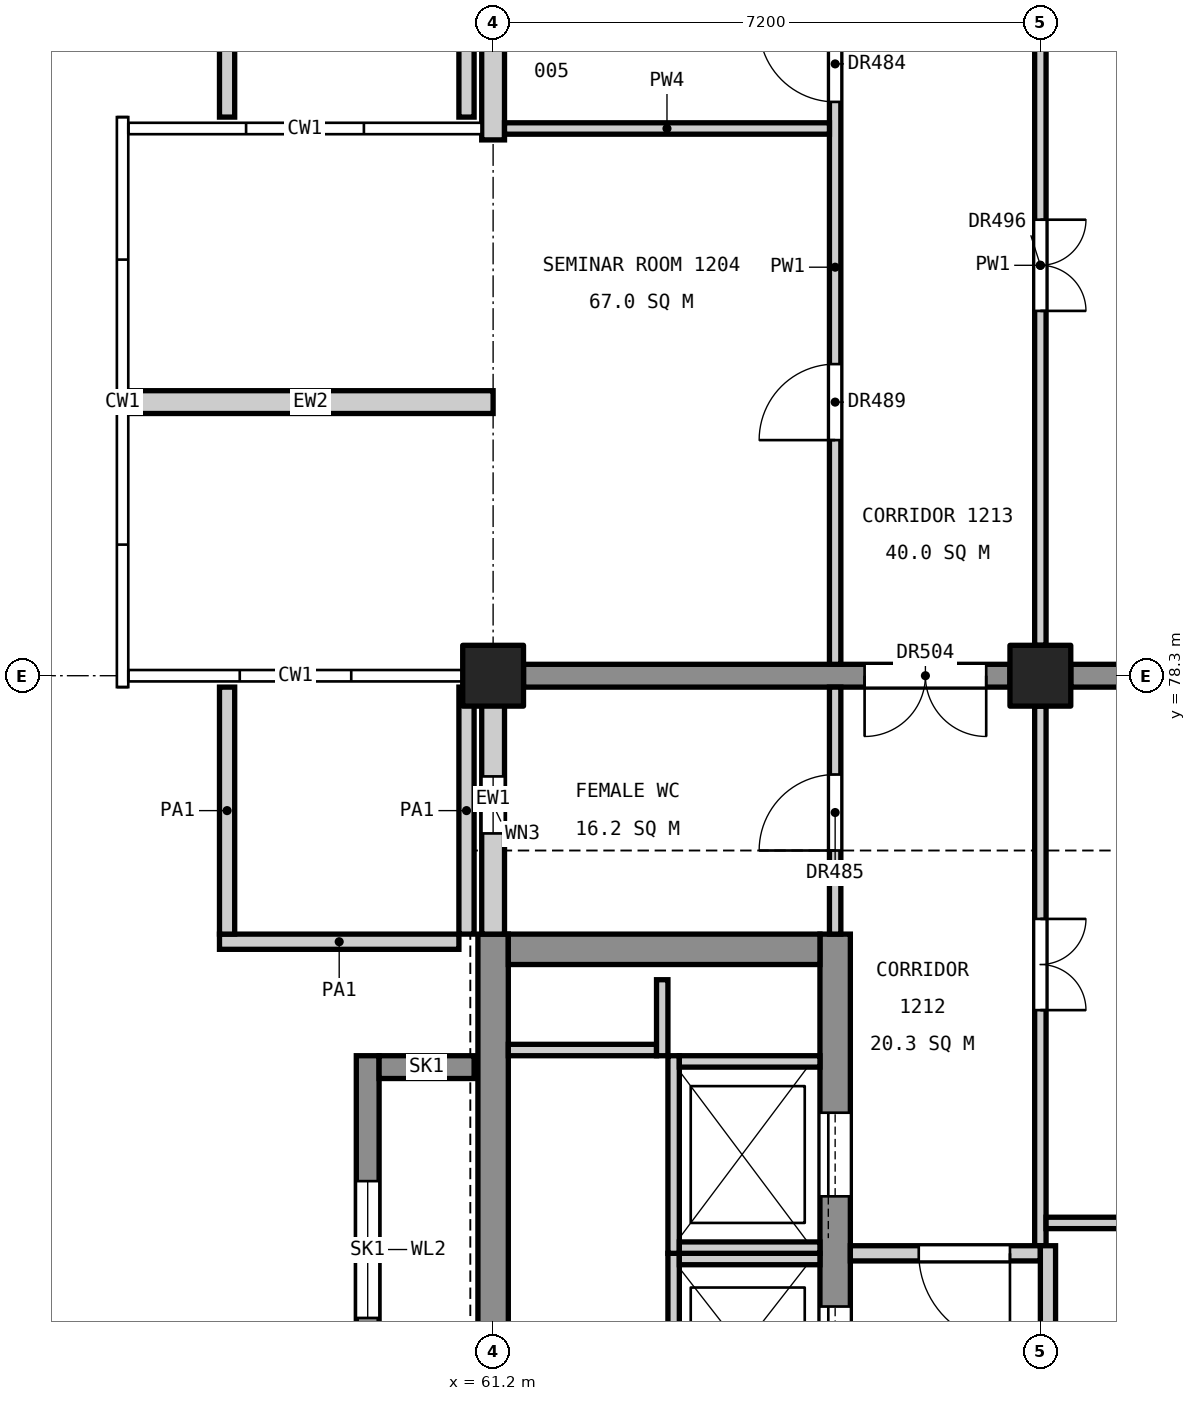
"""IFC4 building model, lengths in metres.
Left out: names, types, materials, properties, quantities, classifications, styles, units other than length and angle.
Written with IfcOpenShell. Run it as: python <this file> out.ifc"""

import sys

from ifc_helpers import new_model, si_unit, direction, frame, frame_2d, origin, origin_2d, place, context, subcontext, project, spatial, rectangle, extrude, element, fill, save


model = new_model("IFC4")
c1 = context("Model", 3, precision=1e-05, world=origin(), true_north=direction((0.0, 1.0)))
c2 = subcontext(c1, "Body", "Model", "MODEL_VIEW")
j1 = project(units=[si_unit("LENGTHUNIT", "METRE"), si_unit("PLANEANGLEUNIT", "RADIAN")], contexts=[c1])
p1 = place(None, origin())
s1 = spatial("IfcSite", under=j1, at=p1, CompositionType="ELEMENT")
p2 = place(p1, origin())
s2 = spatial("IfcBuilding", under=s1, at=p2, CompositionType="ELEMENT")
p3 = place(p2, frame((0.0, 0.0, 60.6)))
s3 = spatial("IfcBuildingStorey", under=s2, at=p3, CompositionType="ELEMENT", Elevation=60.6)
for number, where, z_axis, x_axis in (
    (1, (61.2, 78.3, 0.0), (0.0, 0.0, 1.0), (1.0, 0.0, 0.0)),
    (2, (68.4, 78.3, 0.0), (0.0, 0.0, 1.0), (1.0, 0.0, 0.0)),
):
    element("IfcColumn", number, at=place(p3, frame(where, z_axis=z_axis, x_axis=x_axis)), inside=s3, PredefinedType="COLUMN", context=c2, shape_type="SweptSolid", body=[
        extrude(rectangle(XDim=0.8, YDim=0.8, at=origin_2d()), origin(), (0.0, 0.0, 1.0), 4.8),
    ])
p4 = place(p3, frame((61.2, 60.1, 0.0), z_axis=(0.0, 0.0, 1.0), x_axis=(0.0, 1.0, 0.0)))
e3 = element("IfcWall", 3, at=p4, inside=s3, PredefinedType="SHEAR", context=c2, shape_type="SweptSolid", body=[
    extrude(rectangle(XDim=14.8, YDim=0.4, at=frame_2d((7.4, 0.0))), origin(), (0.0, 0.0, 1.0), 4.55),
])
p5 = place(p4, frame((6.11, 0.0, 3.4)))
e4 = element("IfcOpeningElement", 4, at=p5, cuts=e3, PredefinedType="OPENING", context=c2, shape_type="SweptSolid", body=[
    extrude(rectangle(XDim=1.2, YDim=0.9, at=frame_2d((0.6, 0.45))), frame((0.0, 0.21, 0.0), z_axis=(0.0, -1.0, 0.0), x_axis=(1.0, 0.0, 0.0)), (0.0, 0.0, 1.0), 0.42),
])
p6 = place(p3, frame((65.7, 60.1, 0.0), z_axis=(0.0, 0.0, 1.0), x_axis=(0.0, 1.0, 0.0)))
e5 = element("IfcWall", 5, at=p6, inside=s3, PredefinedType="SHEAR", context=c2, shape_type="SweptSolid", body=[
    extrude(rectangle(XDim=14.8, YDim=0.4, at=frame_2d((7.4, 0.0))), origin(), (0.0, 0.0, 1.0), 4.55),
])
p7 = place(p6, frame((0.5, 0.0, 0.0)))
e6 = element("IfcOpeningElement", 6, at=p7, cuts=e5, PredefinedType="OPENING", context=c2, shape_type="SweptSolid", body=[
    extrude(rectangle(XDim=1.4, YDim=2.1, at=frame_2d((0.7, 1.05))), frame((0.0, 0.21, 0.0), z_axis=(0.0, -1.0, 0.0), x_axis=(1.0, 0.0, 0.0)), (0.0, 0.0, 1.0), 0.42),
])
p8 = place(p6, frame((8.8, 0.0, 0.0)))
e7 = element("IfcOpeningElement", 7, at=p8, cuts=e5, PredefinedType="OPENING", context=c2, shape_type="SweptSolid", body=[
    extrude(rectangle(XDim=1.1, YDim=2.1, at=frame_2d((0.55, 1.05))), frame((0.0, 0.21, 0.0), z_axis=(0.0, -1.0, 0.0), x_axis=(1.0, 0.0, 0.0)), (0.0, 0.0, 1.0), 0.42),
])
p9 = place(p6, frame((11.35, 0.0, 0.0)))
e8 = element("IfcOpeningElement", 8, at=p9, cuts=e5, PredefinedType="OPENING", context=c2, shape_type="SweptSolid", body=[
    extrude(rectangle(XDim=1.1, YDim=2.1, at=frame_2d((0.55, 1.05))), frame((0.0, 0.21, 0.0), z_axis=(0.0, -1.0, 0.0), x_axis=(1.0, 0.0, 0.0)), (0.0, 0.0, 1.0), 0.42),
])
p10 = place(p3, frame((61.4, 74.7, 0.0), z_axis=(0.0, 0.0, 1.0), x_axis=(1.0, 0.0, 0.0)))
e9 = element("IfcWall", 9, at=p10, inside=s3, PredefinedType="SHEAR", context=c2, shape_type="SweptSolid", body=[
    extrude(rectangle(XDim=4.1, YDim=0.4, at=frame_2d((2.05, 0.0))), origin(), (0.0, 0.0, 1.0), 4.55),
])
p11 = place(p3, frame((59.55, 68.2, 0.0), z_axis=(0.0, 0.0, 1.0), x_axis=(0.0, 1.0, 0.0)))
e10 = element("IfcWall", 10, at=p11, inside=s3, PredefinedType="SHEAR", context=c2, shape_type="SweptSolid", body=[
    extrude(rectangle(XDim=5.1, YDim=0.3, at=frame_2d((2.55, 0.0))), origin(), (0.0, 0.0, 1.0), 4.8),
])
p12 = place(p11, frame((1.65, 0.0, 3.0)))
e11 = element("IfcOpeningElement", 11, at=p12, cuts=e10, PredefinedType="OPENING", context=c2, shape_type="SweptSolid", body=[
    extrude(rectangle(XDim=1.8, YDim=1.2, at=frame_2d((0.9, 0.6))), frame((0.0, 0.16, 0.0), z_axis=(0.0, -1.0, 0.0), x_axis=(1.0, 0.0, 0.0)), (0.0, 0.0, 1.0), 0.32),
])
p13 = place(p3, frame((60.95, 73.15, 0.0), z_axis=(0.0, 0.0, 1.0), x_axis=(-1.0, 0.0, 0.0)))
e12 = element("IfcWall", 12, at=p13, inside=s3, PredefinedType="SHEAR", context=c2, shape_type="SweptSolid", body=[
    extrude(rectangle(XDim=1.25, YDim=0.3, at=frame_2d((0.625, 0.0))), origin(), (0.0, 0.0, 1.0), 4.8),
])
p14 = place(p3, frame((61.6, 78.3, 0.0), z_axis=(0.0, 0.0, 1.0), x_axis=(1.0, 0.0, 0.0)))
e13 = element("IfcWall", 13, at=p14, inside=s3, PredefinedType="SHEAR", context=c2, shape_type="SweptSolid", body=[
    extrude(rectangle(XDim=6.4, YDim=0.3, at=frame_2d((3.2, 0.0))), origin(), (0.0, 0.0, 1.0), 4.55),
])
p15 = place(p14, frame((4.488, 0.0, 0.0)))
e14 = element("IfcOpeningElement", 14, at=p15, cuts=e13, PredefinedType="OPENING", context=c2, shape_type="SweptSolid", body=[
    extrude(rectangle(XDim=1.6, YDim=2.1, at=frame_2d((0.8, 1.05))), frame((0.0, 0.16, 0.0), z_axis=(0.0, -1.0, 0.0), x_axis=(1.0, 0.0, 0.0)), (0.0, 0.0, 1.0), 0.32),
])
p16 = place(p3, frame((68.8, 78.3, 0.0), z_axis=(0.0, 0.0, 1.0), x_axis=(1.0, 0.0, 0.0)))
e15 = element("IfcWall", 15, at=p16, inside=s3, PredefinedType="SHEAR", context=c2, shape_type="SweptSolid", body=[
    extrude(rectangle(XDim=10.0, YDim=0.3, at=frame_2d((5.0, 0.0))), origin(), (0.0, 0.0, 1.0), 4.55),
])
p17 = place(p3, frame((63.575, 68.2, 0.0), z_axis=(0.0, 0.0, 1.0), x_axis=(0.0, 1.0, 0.0)))
e16 = element("IfcWall", 16, at=p17, inside=s3, PredefinedType="SOLIDWALL", context=c2, shape_type="SweptSolid", body=[
    extrude(rectangle(XDim=2.5, YDim=0.15, at=frame_2d((1.25, 0.0))), origin(), (0.0, 0.0, 1.0), 4.8),
])
p18 = place(p3, frame((63.65, 70.625, 0.0), z_axis=(0.0, 0.0, 1.0), x_axis=(1.0, 0.0, 0.0)))
e17 = element("IfcWall", 17, at=p18, inside=s3, PredefinedType="SOLIDWALL", context=c2, shape_type="SweptSolid", body=[
    extrude(rectangle(XDim=1.85, YDim=0.15, at=frame_2d((0.925, 0.0))), origin(), (0.0, 0.0, 1.0), 4.8),
])
p19 = place(p3, frame((63.575, 70.7, 0.0), z_axis=(0.0, 0.0, 1.0), x_axis=(0.0, 1.0, 0.0)))
e18 = element("IfcWall", 18, at=p19, inside=s3, PredefinedType="SOLIDWALL", context=c2, shape_type="SweptSolid", body=[
    extrude(rectangle(XDim=2.6, YDim=0.15, at=frame_2d((1.3, 0.0))), origin(), (0.0, 0.0, 1.0), 4.8),
])
for number, where, z_axis, x_axis in (
    (19, (63.65, 70.775, 0.0), (0.0, 0.0, 1.0), (1.0, 0.0, 0.0)),
    (20, (63.65, 73.225, 0.0), (0.0, 0.0, 1.0), (1.0, 0.0, 0.0)),
):
    element("IfcWall", number, at=place(p3, frame(where, z_axis=z_axis, x_axis=x_axis)), inside=s3, PredefinedType="SOLIDWALL", context=c2, shape_type="SweptSolid", body=[
        extrude(rectangle(XDim=1.85, YDim=0.15, at=frame_2d((0.925, 0.0))), origin(), (0.0, 0.0, 1.0), 4.8),
    ])
p20 = place(p3, frame((61.4, 73.375, 0.0), z_axis=(0.0, 0.0, 1.0), x_axis=(1.0, 0.0, 0.0)))
e21 = element("IfcWall", 21, at=p20, inside=s3, PredefinedType="SOLIDWALL", context=c2, shape_type="SweptSolid", body=[
    extrude(rectangle(XDim=1.95, YDim=0.15, at=frame_2d((0.975, 0.0))), origin(), (0.0, 0.0, 1.0), 4.8),
])
p21 = place(p3, frame((63.425, 73.3, 0.0), z_axis=(0.0, 0.0, 1.0), x_axis=(0.0, 1.0, 0.0)))
e22 = element("IfcWall", 22, at=p21, inside=s3, PredefinedType="SOLIDWALL", context=c2, shape_type="SweptSolid", body=[
    extrude(rectangle(XDim=1.0, YDim=0.15, at=frame_2d((0.5, 0.0))), origin(), (0.0, 0.0, 1.0), 4.8),
])
p22 = place(p3, frame((60.85, 78.15, 0.0), z_axis=(0.0, 0.0, 1.0), x_axis=(0.0, -1.0, 0.0)))
e23 = element("IfcWall", 23, at=p22, inside=s3, PredefinedType="PARAPET", context=c2, shape_type="SweptSolid", body=[
    extrude(rectangle(XDim=3.25, YDim=0.2, at=frame_2d((1.625, 0.0))), origin(), (0.0, 0.0, 1.0), 1.2),
])
p23 = place(p3, frame((60.75, 74.8, 0.0), z_axis=(0.0, 0.0, 1.0), x_axis=(-1.0, 0.0, 0.0)))
e24 = element("IfcWall", 24, at=p23, inside=s3, PredefinedType="PARAPET", context=c2, shape_type="SweptSolid", body=[
    extrude(rectangle(XDim=3.15, YDim=0.2, at=frame_2d((1.575, 0.0))), origin(), (0.0, 0.0, 1.0), 1.2),
])
for number, where, z_axis, x_axis in (
    (25, (57.7, 74.9, 0.0), (0.0, 0.0, 1.0), (0.0, 1.0, 0.0)),
    (26, (60.85, 88.9, 0.0), (0.0, 0.0, 1.0), (0.0, -1.0, 0.0)),
    (27, (57.7, 85.65, 0.0), (0.0, 0.0, 1.0), (0.0, 1.0, 0.0)),
):
    element("IfcWall", number, at=place(p3, frame(where, z_axis=z_axis, x_axis=x_axis)), inside=s3, PredefinedType="PARAPET", context=c2, shape_type="SweptSolid", body=[
        extrude(rectangle(XDim=3.25, YDim=0.2, at=frame_2d((1.625, 0.0))), origin(), (0.0, 0.0, 1.0), 1.2),
    ])
p24 = place(p3, frame((61.2, 74.9, 0.0), z_axis=(0.0, 0.0, 1.0), x_axis=(0.0, 1.0, 0.0)))
e28 = element("IfcWall", 28, at=p24, inside=s3, PredefinedType="STANDARD", context=c2, shape_type="SweptSolid", body=[
    extrude(rectangle(XDim=3.55, YDim=0.3, at=frame_2d((1.775, 0.0))), origin(), (0.0, 0.0, 1.0), 3.65),
])
p25 = place(p24, frame((1.325, 0.0, 0.8)))
e29 = element("IfcOpeningElement", 29, at=p25, cuts=e28, PredefinedType="OPENING", context=c2, shape_type="SweptSolid", body=[
    extrude(rectangle(XDim=0.75, YDim=1.2, at=frame_2d((0.375, 0.6))), frame((0.0, 0.16, 0.0), z_axis=(0.0, -1.0, 0.0), x_axis=(1.0, 0.0, 0.0)), (0.0, 0.0, 1.0), 0.32),
])
p26 = place(p3, frame((61.2, 85.35, 0.0), z_axis=(0.0, 0.0, 1.0), x_axis=(0.0, 1.0, 0.0)))
e30 = element("IfcWall", 30, at=p26, inside=s3, PredefinedType="STANDARD", context=c2, shape_type="SweptSolid", body=[
    extrude(rectangle(XDim=3.55, YDim=0.3, at=frame_2d((1.775, 0.0))), origin(), (0.0, 0.0, 1.0), 3.65),
])
p27 = place(p3, frame((56.4, 81.9, 0.0), z_axis=(0.0, 0.0, 1.0), x_axis=(1.0, 0.0, 0.0)))
e31 = element("IfcWall", 31, at=p27, inside=s3, PredefinedType="STANDARD", context=c2, shape_type="SweptSolid", body=[
    extrude(rectangle(XDim=4.8, YDim=0.3, at=frame_2d((2.4, 0.0))), origin(), (0.0, 0.0, 1.0), 3.65),
])
p28 = place(p3, frame((65.7, 74.9, 0.0), z_axis=(0.0, 0.0, 1.0), x_axis=(0.0, 1.0, 0.0)))
e32 = element("IfcWall", 32, at=p28, inside=s3, PredefinedType="PARTITIONING", context=c2, shape_type="SweptSolid", body=[
    extrude(rectangle(XDim=3.25, YDim=0.15, at=frame_2d((1.625, 0.0))), origin(), (0.0, 0.0, 1.0), 3.55),
])
p29 = place(p28, frame((1.1, 0.0, 0.0)))
e33 = element("IfcOpeningElement", 33, at=p29, cuts=e32, PredefinedType="OPENING", context=c2, shape_type="SweptSolid", body=[
    extrude(rectangle(XDim=1.0, YDim=2.1, at=frame_2d((0.5, 1.05))), frame((0.0, 0.085, 0.0), z_axis=(0.0, -1.0, 0.0), x_axis=(1.0, 0.0, 0.0)), (0.0, 0.0, 1.0), 0.17),
])
p30 = place(p3, frame((65.7, 78.45, 0.0), z_axis=(0.0, 0.0, 1.0), x_axis=(0.0, 1.0, 0.0)))
e34 = element("IfcWall", 34, at=p30, inside=s3, PredefinedType="PARTITIONING", context=c2, shape_type="SweptSolid", body=[
    extrude(rectangle(XDim=10.45, YDim=0.15, at=frame_2d((5.225, 0.0))), origin(), (0.0, 0.0, 1.0), 3.55),
])
p31 = place(p30, frame((7.4, 0.0, 0.0)))
e35 = element("IfcOpeningElement", 35, at=p31, cuts=e34, PredefinedType="OPENING", context=c2, shape_type="SweptSolid", body=[
    extrude(rectangle(XDim=1.0, YDim=2.1, at=frame_2d((0.5, 1.05))), frame((0.0, 0.085, 0.0), z_axis=(0.0, -1.0, 0.0), x_axis=(1.0, 0.0, 0.0)), (0.0, 0.0, 1.0), 0.17),
])
p32 = place(p30, frame((9.2, 0.0, 0.0)))
e36 = element("IfcOpeningElement", 36, at=p32, cuts=e34, PredefinedType="OPENING", context=c2, shape_type="SweptSolid", body=[
    extrude(rectangle(XDim=1.0, YDim=2.1, at=frame_2d((0.5, 1.05))), frame((0.0, 0.085, 0.0), z_axis=(0.0, -1.0, 0.0), x_axis=(1.0, 0.0, 0.0)), (0.0, 0.0, 1.0), 0.17),
])
p33 = place(p30, frame((2.95, 0.0, 0.0)))
e37 = element("IfcOpeningElement", 37, at=p33, cuts=e34, PredefinedType="OPENING", context=c2, shape_type="SweptSolid", body=[
    extrude(rectangle(XDim=1.0, YDim=2.1, at=frame_2d((0.5, 1.05))), frame((0.0, 0.085, 0.0), z_axis=(0.0, -1.0, 0.0), x_axis=(1.0, 0.0, 0.0)), (0.0, 0.0, 1.0), 0.17),
])
p34 = place(p3, frame((61.35, 85.5, 0.0), z_axis=(0.0, 0.0, 1.0), x_axis=(1.0, 0.0, 0.0)))
e38 = element("IfcWall", 38, at=p34, inside=s3, PredefinedType="PARTITIONING", context=c2, shape_type="SweptSolid", body=[
    extrude(rectangle(XDim=4.275, YDim=0.15, at=frame_2d((2.137, 0.0))), origin(), (0.0, 0.0, 1.0), 3.85),
])
p35 = place(p3, frame((68.4, 70.8, 0.0), z_axis=(0.0, 0.0, 1.0), x_axis=(0.0, 1.0, 0.0)))
e39 = element("IfcWall", 39, at=p35, inside=s3, PredefinedType="PARTITIONING", context=c2, shape_type="SweptSolid", body=[
    extrude(rectangle(XDim=7.1, YDim=0.15, at=frame_2d((3.55, 0.0))), origin(), (0.0, 0.0, 1.0), 3.55),
])
p36 = place(p35, frame((3.1, 0.0, 0.0)))
e40 = element("IfcOpeningElement", 40, at=p36, cuts=e39, PredefinedType="OPENING", context=c2, shape_type="SweptSolid", body=[
    extrude(rectangle(XDim=1.2, YDim=2.1, at=frame_2d((0.6, 1.05))), frame((0.0, 0.085, 0.0), z_axis=(0.0, -1.0, 0.0), x_axis=(1.0, 0.0, 0.0)), (0.0, 0.0, 1.0), 0.17),
])
p37 = place(p3, frame((68.4, 78.7, 0.0), z_axis=(0.0, 0.0, 1.0), x_axis=(0.0, 1.0, 0.0)))
e41 = element("IfcWall", 41, at=p37, inside=s3, PredefinedType="PARTITIONING", context=c2, shape_type="SweptSolid", body=[
    extrude(rectangle(XDim=10.0, YDim=0.15, at=frame_2d((5.0, 0.0))), origin(), (0.0, 0.0, 1.0), 3.55),
])
p38 = place(p37, frame((4.4, 0.0, 0.0)))
e42 = element("IfcOpeningElement", 42, at=p38, cuts=e41, PredefinedType="OPENING", context=c2, shape_type="SweptSolid", body=[
    extrude(rectangle(XDim=1.2, YDim=2.1, at=frame_2d((0.6, 1.05))), frame((0.0, 0.085, 0.0), z_axis=(0.0, -1.0, 0.0), x_axis=(1.0, 0.0, 0.0)), (0.0, 0.0, 1.0), 0.17),
])
p39 = place(p3, frame((65.9, 70.7, 0.0), z_axis=(0.0, 0.0, 1.0), x_axis=(1.0, 0.0, 0.0)))
e43 = element("IfcWall", 43, at=p39, inside=s3, PredefinedType="PARTITIONING", context=c2, shape_type="SweptSolid", body=[
    extrude(rectangle(XDim=2.5, YDim=0.2, at=frame_2d((1.25, 0.0))), origin(), (0.0, 0.0, 1.0), 3.55),
])
p40 = place(p39, frame((0.9, 0.0, 0.0)))
e44 = element("IfcOpeningElement", 44, at=p40, cuts=e43, PredefinedType="OPENING", context=c2, shape_type="SweptSolid", body=[
    extrude(rectangle(XDim=1.2, YDim=2.1, at=frame_2d((0.6, 1.05))), frame((0.0, 0.11, 0.0), z_axis=(0.0, -1.0, 0.0), x_axis=(1.0, 0.0, 0.0)), (0.0, 0.0, 1.0), 0.22),
])
p41 = place(p3, frame((68.5, 67.9, 0.0), z_axis=(0.0, 0.0, 1.0), x_axis=(0.0, 1.0, 0.0)))
e45 = element("IfcWall", 45, at=p41, inside=s3, PredefinedType="PARTITIONING", context=c2, shape_type="SweptSolid", body=[
    extrude(rectangle(XDim=2.9, YDim=0.2, at=frame_2d((1.45, 0.0))), origin(), (0.0, 0.0, 1.0), 3.55),
])
p42 = place(p3, frame((68.475, 71.1, 0.0), z_axis=(0.0, 0.0, 1.0), x_axis=(1.0, 0.0, 0.0)))
e46 = element("IfcWall", 46, at=p42, inside=s3, PredefinedType="PARTITIONING", context=c2, shape_type="SweptSolid", body=[
    extrude(rectangle(XDim=10.575, YDim=0.15, at=frame_2d((5.288, 0.0))), origin(), (0.0, 0.0, 1.0), 3.85),
])
p43 = place(p8, origin())
e47 = element("IfcDoor", 47, at=p43, inside=s3, OperationType="SLIDING_TO_LEFT", PredefinedType="DOOR", context=c2, shape_type="SweptSolid", body=[
    extrude(rectangle(XDim=1.1, YDim=2.1, at=frame_2d((0.55, 1.05))), frame((0.0, 0.025, 0.0), z_axis=(0.0, -1.0, 0.0), x_axis=(1.0, 0.0, 0.0)), (0.0, 0.0, 1.0), 0.05),
])
fill(e7, e47)
p44 = place(p9, origin())
e48 = element("IfcDoor", 48, at=p44, inside=s3, OperationType="SLIDING_TO_LEFT", PredefinedType="DOOR", context=c2, shape_type="SweptSolid", body=[
    extrude(rectangle(XDim=1.1, YDim=2.1, at=frame_2d((0.55, 1.05))), frame((0.0, 0.025, 0.0), z_axis=(0.0, -1.0, 0.0), x_axis=(1.0, 0.0, 0.0)), (0.0, 0.0, 1.0), 0.05),
])
fill(e8, e48)
p45 = place(p25, origin())
e49 = element("IfcWindow", 49, at=p45, inside=s3, PartitioningType="SINGLE_PANEL", PredefinedType="WINDOW", context=c2, shape_type="SweptSolid", body=[
    extrude(rectangle(XDim=0.75, YDim=1.2, at=frame_2d((0.375, 0.6))), frame((0.0, 0.03, 0.0), z_axis=(0.0, -1.0, 0.0), x_axis=(1.0, 0.0, 0.0)), (0.0, 0.0, 1.0), 0.06),
])
fill(e29, e49)
p46 = place(p12, origin())
e50 = element("IfcWindow", 50, at=p46, inside=s3, PartitioningType="SINGLE_PANEL", PredefinedType="WINDOW", context=c2, shape_type="SweptSolid", body=[
    extrude(rectangle(XDim=1.8, YDim=1.2, at=frame_2d((0.9, 0.6))), frame((0.0, 0.03, 0.0), z_axis=(0.0, -1.0, 0.0), x_axis=(1.0, 0.0, 0.0)), (0.0, 0.0, 1.0), 0.06),
])
fill(e11, e50)
p47 = place(p31, origin())
e51 = element("IfcDoor", 51, at=p47, inside=s3, OperationType="SINGLE_SWING_RIGHT", PredefinedType="DOOR", context=c2, shape_type="SweptSolid", body=[
    extrude(rectangle(XDim=1.0, YDim=2.1, at=frame_2d((0.5, 1.05))), frame((0.0, 0.025, 0.0), z_axis=(0.0, -1.0, 0.0), x_axis=(1.0, 0.0, 0.0)), (0.0, 0.0, 1.0), 0.05),
])
fill(e35, e51)
p48 = place(p29, origin())
e52 = element("IfcDoor", 52, at=p48, inside=s3, OperationType="SINGLE_SWING_LEFT", PredefinedType="DOOR", context=c2, shape_type="SweptSolid", body=[
    extrude(rectangle(XDim=1.0, YDim=2.1, at=frame_2d((0.5, 1.05))), frame((0.0, 0.025, 0.0), z_axis=(0.0, -1.0, 0.0), x_axis=(1.0, 0.0, 0.0)), (0.0, 0.0, 1.0), 0.05),
])
fill(e33, e52)
p49 = place(p33, origin())
e53 = element("IfcDoor", 53, at=p49, inside=s3, OperationType="SINGLE_SWING_LEFT", PredefinedType="DOOR", context=c2, shape_type="SweptSolid", body=[
    extrude(rectangle(XDim=1.0, YDim=2.1, at=frame_2d((0.5, 1.05))), frame((0.0, 0.025, 0.0), z_axis=(0.0, -1.0, 0.0), x_axis=(1.0, 0.0, 0.0)), (0.0, 0.0, 1.0), 0.05),
])
fill(e37, e53)
p50 = place(p36, frame((1.2, 0.0, 0.0), z_axis=(0.0, 0.0, 1.0), x_axis=(-1.0, 0.0, 0.0)))
e54 = element("IfcDoor", 54, at=p50, inside=s3, OperationType="DOUBLE_DOOR_SINGLE_SWING", PredefinedType="DOOR", context=c2, shape_type="SweptSolid", body=[
    extrude(rectangle(XDim=1.2, YDim=2.1, at=frame_2d((0.6, 1.05))), frame((0.0, 0.025, 0.0), z_axis=(0.0, -1.0, 0.0), x_axis=(1.0, 0.0, 0.0)), (0.0, 0.0, 1.0), 0.05),
])
fill(e40, e54)
p51 = place(p38, frame((1.2, 0.0, 0.0), z_axis=(0.0, 0.0, 1.0), x_axis=(-1.0, 0.0, 0.0)))
e55 = element("IfcDoor", 55, at=p51, inside=s3, OperationType="DOUBLE_DOOR_SINGLE_SWING", PredefinedType="DOOR", context=c2, shape_type="SweptSolid", body=[
    extrude(rectangle(XDim=1.2, YDim=2.1, at=frame_2d((0.6, 1.05))), frame((0.0, 0.025, 0.0), z_axis=(0.0, -1.0, 0.0), x_axis=(1.0, 0.0, 0.0)), (0.0, 0.0, 1.0), 0.05),
])
fill(e42, e55)
p52 = place(p40, frame((1.2, 0.0, 0.0), z_axis=(0.0, 0.0, 1.0), x_axis=(-1.0, 0.0, 0.0)))
e56 = element("IfcDoor", 56, at=p52, inside=s3, OperationType="SINGLE_SWING_LEFT", PredefinedType="DOOR", context=c2, shape_type="SweptSolid", body=[
    extrude(rectangle(XDim=1.2, YDim=2.1, at=frame_2d((0.6, 1.05))), frame((0.0, 0.025, 0.0), z_axis=(0.0, -1.0, 0.0), x_axis=(1.0, 0.0, 0.0)), (0.0, 0.0, 1.0), 0.05),
])
fill(e44, e56)
p53 = place(p15, frame((1.6, 0.0, 0.0), z_axis=(0.0, 0.0, 1.0), x_axis=(-1.0, 0.0, 0.0)))
e57 = element("IfcDoor", 57, at=p53, inside=s3, OperationType="DOUBLE_DOOR_SINGLE_SWING", PredefinedType="DOOR", context=c2, shape_type="SweptSolid", body=[
    extrude(rectangle(XDim=1.6, YDim=2.1, at=frame_2d((0.8, 1.05))), frame((0.0, 0.025, 0.0), z_axis=(0.0, -1.0, 0.0), x_axis=(1.0, 0.0, 0.0)), (0.0, 0.0, 1.0), 0.05),
])
fill(e14, e57)
save(model, sys.argv[1])
